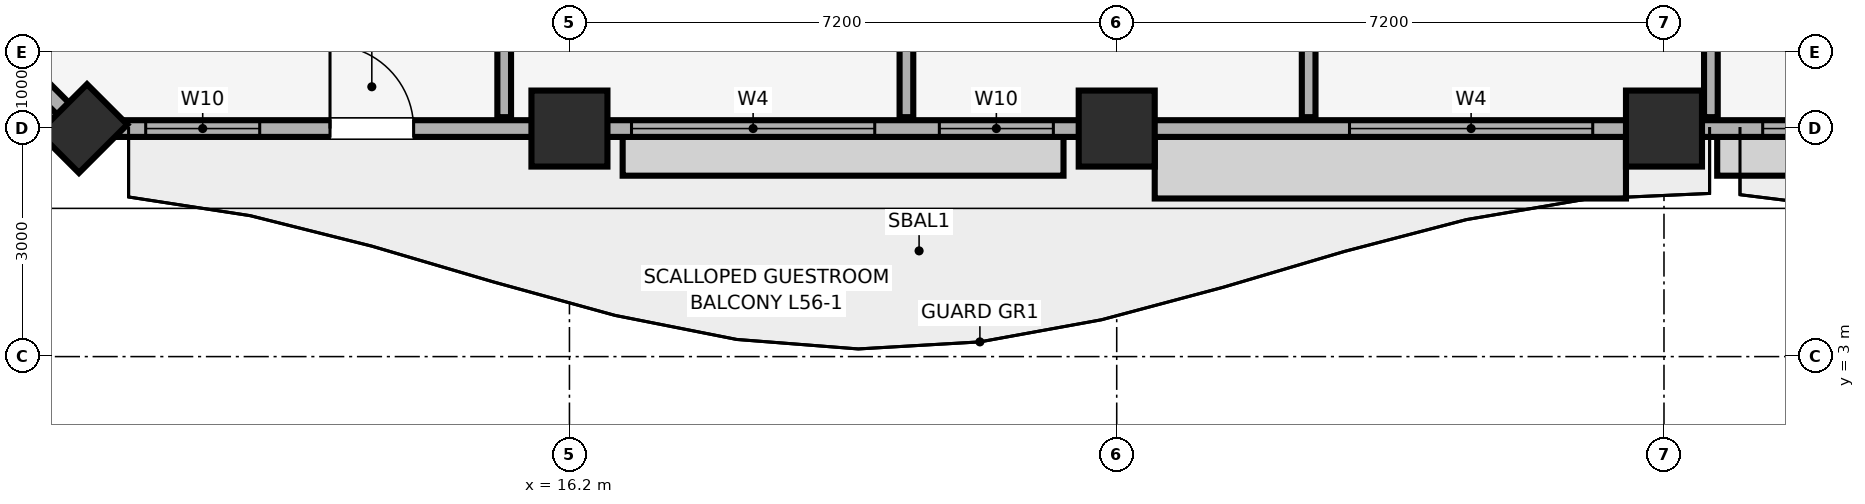
"""IFC4 building model, lengths in metres.
Left out: names, types, materials, properties, quantities, classifications, styles, units other than length and angle.
Written with IfcOpenShell. Run it as: python <this file> out.ifc"""

import sys

from ifc_helpers import new_model, si_unit, direction, frame, frame_2d, origin, origin_2d, place, context, subcontext, project, spatial, rectangle, extrude, element, fill, save


model = new_model("IFC4")
c1 = context("Model", 3, precision=1e-05, world=origin(), true_north=direction((0.0, 1.0)))
c2 = subcontext(c1, "Body", "Model", "MODEL_VIEW")
j1 = project(units=[si_unit("LENGTHUNIT", "METRE"), si_unit("PLANEANGLEUNIT", "RADIAN")], contexts=[c1])
p1 = place(None, origin())
s1 = spatial("IfcSite", under=j1, at=p1, CompositionType="ELEMENT")
p2 = place(p1, origin())
s2 = spatial("IfcBuilding", under=s1, at=p2, CompositionType="ELEMENT")
p3 = place(p2, frame((0.0, 0.0, 229.15)))
s3 = spatial("IfcBuildingStorey", under=s2, at=p3, CompositionType="ELEMENT", Elevation=229.15)
for number, where, z_axis, x_axis in (
    (1, (16.2, 6.0, 0.0), (0.0, 0.0, 1.0), (1.0, 0.0, 0.0)),
    (2, (23.4, 6.0, 0.0), (0.0, 0.0, 1.0), (1.0, 0.0, 0.0)),
    (3, (30.6, 6.0, 0.0), (0.0, 0.0, 1.0), (1.0, 0.0, 0.0)),
):
    element("IfcColumn", number, at=place(p3, frame(where, z_axis=z_axis, x_axis=x_axis)), inside=s3, PredefinedType="COLUMN", context=c2, shape_type="SweptSolid", body=[
        extrude(rectangle(XDim=1.0, YDim=1.0, at=origin_2d()), origin(), (0.0, 0.0, 1.0), 3.71),
    ])
p4 = place(p3, frame((9.8, 6.0, 0.0), z_axis=(0.0, 0.0, 1.0), x_axis=(0.707106781187, 0.707106781187, 0.0)))
e4 = element("IfcColumn", 4, at=p4, inside=s3, PredefinedType="PILASTER", context=c2, shape_type="SweptSolid", body=[
    extrude(rectangle(XDim=0.9, YDim=0.75, at=origin_2d()), origin(), (0.0, 0.0, 1.0), 3.71),
])
p5 = place(p3, frame((9.8, 6.0, 0.0), z_axis=(0.0, 0.0, 1.0), x_axis=(1.0, 0.0, 0.0)))
e5 = element("IfcWall", 5, at=p5, inside=s3, PredefinedType="SOLIDWALL", context=c2, shape_type="SweptSolid", body=[
    extrude(rectangle(XDim=64.4, YDim=0.22, at=frame_2d((32.2, 0.0))), origin(), (0.0, 0.0, 1.0), 2.91),
])
p6 = place(p5, frame((3.25, 0.0, 0.0)))
e6 = element("IfcOpeningElement", 6, at=p6, cuts=e5, PredefinedType="OPENING", context=c2, shape_type="SweptSolid", body=[
    extrude(rectangle(XDim=1.1, YDim=2.15, at=frame_2d((0.55, 1.075))), frame((0.0, 0.12, 0.0), z_axis=(0.0, -1.0, 0.0), x_axis=(1.0, 0.0, 0.0)), (0.0, 0.0, 1.0), 0.24),
])
p7 = place(p5, frame((24.45, 0.0, 0.0)))
e7 = element("IfcOpeningElement", 7, at=p7, cuts=e5, PredefinedType="OPENING", context=c2, shape_type="SweptSolid", body=[
    extrude(rectangle(XDim=1.1, YDim=2.15, at=frame_2d((0.55, 1.075))), frame((0.0, 0.12, 0.0), z_axis=(0.0, -1.0, 0.0), x_axis=(1.0, 0.0, 0.0)), (0.0, 0.0, 1.0), 0.24),
])
p8 = place(p5, frame((45.65, 0.0, 0.0)))
e8 = element("IfcOpeningElement", 8, at=p8, cuts=e5, PredefinedType="OPENING", context=c2, shape_type="SweptSolid", body=[
    extrude(rectangle(XDim=1.1, YDim=2.15, at=frame_2d((0.55, 1.075))), frame((0.0, 0.12, 0.0), z_axis=(0.0, -1.0, 0.0), x_axis=(1.0, 0.0, 0.0)), (0.0, 0.0, 1.0), 0.24),
])
p9 = place(p5, frame((0.825, 0.0, 0.85)))
e9 = element("IfcOpeningElement", 9, at=p9, cuts=e5, PredefinedType="OPENING", context=c2, shape_type="SweptSolid", body=[
    extrude(rectangle(XDim=1.5, YDim=1.4, at=frame_2d((0.75, 0.7))), frame((0.0, 0.12, 0.0), z_axis=(0.0, -1.0, 0.0), x_axis=(1.0, 0.0, 0.0)), (0.0, 0.0, 1.0), 0.24),
])
p10 = place(p5, frame((7.217, 0.0, 0.85)))
e10 = element("IfcOpeningElement", 10, at=p10, cuts=e5, PredefinedType="OPENING", context=c2, shape_type="SweptSolid", body=[
    extrude(rectangle(XDim=3.2, YDim=1.85, at=frame_2d((1.6, 0.925))), frame((0.0, 0.12, 0.0), z_axis=(0.0, -1.0, 0.0), x_axis=(1.0, 0.0, 0.0)), (0.0, 0.0, 1.0), 0.24),
])
p11 = place(p5, frame((11.267, 0.0, 0.85)))
e11 = element("IfcOpeningElement", 11, at=p11, cuts=e5, PredefinedType="OPENING", context=c2, shape_type="SweptSolid", body=[
    extrude(rectangle(XDim=1.5, YDim=1.4, at=frame_2d((0.75, 0.7))), frame((0.0, 0.12, 0.0), z_axis=(0.0, -1.0, 0.0), x_axis=(1.0, 0.0, 0.0)), (0.0, 0.0, 1.0), 0.24),
])
p12 = place(p5, frame((16.663, 0.0, 0.85)))
e12 = element("IfcOpeningElement", 12, at=p12, cuts=e5, PredefinedType="OPENING", context=c2, shape_type="SweptSolid", body=[
    extrude(rectangle(XDim=3.2, YDim=1.85, at=frame_2d((1.6, 0.925))), frame((0.0, 0.12, 0.0), z_axis=(0.0, -1.0, 0.0), x_axis=(1.0, 0.0, 0.0)), (0.0, 0.0, 1.0), 0.24),
])
p13 = place(p5, frame((22.098, 0.0, 0.85)))
e13 = element("IfcOpeningElement", 13, at=p13, cuts=e5, PredefinedType="OPENING", context=c2, shape_type="SweptSolid", body=[
    extrude(rectangle(XDim=1.5, YDim=1.4, at=frame_2d((0.75, 0.7))), frame((0.0, 0.12, 0.0), z_axis=(0.0, -1.0, 0.0), x_axis=(1.0, 0.0, 0.0)), (0.0, 0.0, 1.0), 0.24),
])
p14 = place(p5, frame((29.0, 0.0, 0.85)))
e14 = element("IfcOpeningElement", 14, at=p14, cuts=e5, PredefinedType="OPENING", context=c2, shape_type="SweptSolid", body=[
    extrude(rectangle(XDim=2.4, YDim=1.5, at=frame_2d((1.2, 0.75))), frame((0.0, 0.12, 0.0), z_axis=(0.0, -1.0, 0.0), x_axis=(1.0, 0.0, 0.0)), (0.0, 0.0, 1.0), 0.24),
])
p15 = place(p5, frame((32.4, 0.0, 0.85)))
e15 = element("IfcOpeningElement", 15, at=p15, cuts=e5, PredefinedType="OPENING", context=c2, shape_type="SweptSolid", body=[
    extrude(rectangle(XDim=3.2, YDim=1.85, at=frame_2d((1.6, 0.925))), frame((0.0, 0.12, 0.0), z_axis=(0.0, -1.0, 0.0), x_axis=(1.0, 0.0, 0.0)), (0.0, 0.0, 1.0), 0.24),
])
p16 = place(p5, frame((38.138, 0.0, 0.85)))
e16 = element("IfcOpeningElement", 16, at=p16, cuts=e5, PredefinedType="OPENING", context=c2, shape_type="SweptSolid", body=[
    extrude(rectangle(XDim=3.6, YDim=1.75, at=frame_2d((1.8, 0.875))), frame((0.0, 0.12, 0.0), z_axis=(0.0, -1.0, 0.0), x_axis=(1.0, 0.0, 0.0)), (0.0, 0.0, 1.0), 0.24),
])
p17 = place(p5, frame((48.387, 0.0, 0.85)))
e17 = element("IfcOpeningElement", 17, at=p17, cuts=e5, PredefinedType="OPENING", context=c2, shape_type="SweptSolid", body=[
    extrude(rectangle(XDim=1.5, YDim=1.4, at=frame_2d((0.75, 0.7))), frame((0.0, 0.12, 0.0), z_axis=(0.0, -1.0, 0.0), x_axis=(1.0, 0.0, 0.0)), (0.0, 0.0, 1.0), 0.24),
])
p18 = place(p5, frame((53.583, 0.0, 0.85)))
e18 = element("IfcOpeningElement", 18, at=p18, cuts=e5, PredefinedType="OPENING", context=c2, shape_type="SweptSolid", body=[
    extrude(rectangle(XDim=3.6, YDim=1.75, at=frame_2d((1.8, 0.875))), frame((0.0, 0.12, 0.0), z_axis=(0.0, -1.0, 0.0), x_axis=(1.0, 0.0, 0.0)), (0.0, 0.0, 1.0), 0.24),
])
p19 = place(p5, frame((59.695, 0.0, 0.85)))
e19 = element("IfcOpeningElement", 19, at=p19, cuts=e5, PredefinedType="OPENING", context=c2, shape_type="SweptSolid", body=[
    extrude(rectangle(XDim=3.6, YDim=1.75, at=frame_2d((1.8, 0.875))), frame((0.0, 0.12, 0.0), z_axis=(0.0, -1.0, 0.0), x_axis=(1.0, 0.0, 0.0)), (0.0, 0.0, 1.0), 0.24),
])
p20 = place(p3, frame((6.0, 9.8, 0.0), z_axis=(0.0, 0.0, 1.0), x_axis=(0.707106781187, -0.707106781187, 0.0)))
e20 = element("IfcWall", 20, at=p20, inside=s3, PredefinedType="SOLIDWALL", context=c2, shape_type="SweptSolid", body=[
    extrude(rectangle(XDim=5.374, YDim=0.22, at=frame_2d((2.687, 0.0))), origin(), (0.0, 0.0, 1.0), 2.91),
])
p21 = place(p20, frame((1.637, 0.0, 0.85)))
e21 = element("IfcOpeningElement", 21, at=p21, cuts=e20, PredefinedType="OPENING", context=c2, shape_type="SweptSolid", body=[
    extrude(rectangle(XDim=2.1, YDim=1.6, at=frame_2d((1.05, 0.8))), frame((0.0, 0.12, 0.0), z_axis=(0.0, -1.0, 0.0), x_axis=(1.0, 0.0, 0.0)), (0.0, 0.0, 1.0), 0.24),
])
p22 = place(p3, frame((15.342, 6.15, 0.0), z_axis=(0.0, 0.0, 1.0), x_axis=(0.0, 1.0, 0.0)))
e22 = element("IfcWall", 22, at=p22, inside=s3, PredefinedType="PARTITIONING", context=c2, shape_type="SweptSolid", body=[
    extrude(rectangle(XDim=5.355, YDim=0.18, at=frame_2d((2.677, 0.0))), origin(), (0.0, 0.0, 1.0), 3.08),
])
for number, where, z_axis, x_axis in (
    (23, (20.633, 6.15, 0.0), (0.0, 0.0, 1.0), (0.0, 1.0, 0.0)),
    (24, (25.925, 6.15, 0.0), (0.0, 0.0, 1.0), (0.0, 1.0, 0.0)),
    (25, (31.217, 6.15, 0.0), (0.0, 0.0, 1.0), (0.0, 1.0, 0.0)),
):
    element("IfcWall", number, at=place(p3, frame(where, z_axis=z_axis, x_axis=x_axis)), inside=s3, PredefinedType="PARTITIONING", context=c2, shape_type="SweptSolid", body=[
        extrude(rectangle(XDim=5.355, YDim=0.18, at=frame_2d((2.677, 0.0))), origin(), (0.0, 0.0, 1.0), 3.71),
    ])
p23 = place(p6, origin())
e26 = element("IfcDoor", 26, at=p23, inside=s3, OperationType="SINGLE_SWING_LEFT", PredefinedType="DOOR", context=c2, shape_type="SweptSolid", body=[
    extrude(rectangle(XDim=1.1, YDim=2.15, at=frame_2d((0.55, 1.075))), frame((0.0, 0.025, 0.0), z_axis=(0.0, -1.0, 0.0), x_axis=(1.0, 0.0, 0.0)), (0.0, 0.0, 1.0), 0.05),
])
fill(e6, e26)
p24 = place(p9, origin())
e27 = element("IfcWindow", 27, at=p24, inside=s3, PartitioningType="SINGLE_PANEL", PredefinedType="WINDOW", context=c2, shape_type="SweptSolid", body=[
    extrude(rectangle(XDim=1.5, YDim=1.4, at=frame_2d((0.75, 0.7))), frame((0.0, 0.03, 0.0), z_axis=(0.0, -1.0, 0.0), x_axis=(1.0, 0.0, 0.0)), (0.0, 0.0, 1.0), 0.06),
])
fill(e9, e27)
p25 = place(p10, origin())
e28 = element("IfcWindow", 28, at=p25, inside=s3, PartitioningType="SINGLE_PANEL", PredefinedType="WINDOW", context=c2, shape_type="SweptSolid", body=[
    extrude(rectangle(XDim=3.2, YDim=1.85, at=frame_2d((1.6, 0.925))), frame((0.0, 0.03, 0.0), z_axis=(0.0, -1.0, 0.0), x_axis=(1.0, 0.0, 0.0)), (0.0, 0.0, 1.0), 0.06),
])
fill(e10, e28)
p26 = place(p11, origin())
e29 = element("IfcWindow", 29, at=p26, inside=s3, PartitioningType="SINGLE_PANEL", PredefinedType="WINDOW", context=c2, shape_type="SweptSolid", body=[
    extrude(rectangle(XDim=1.5, YDim=1.4, at=frame_2d((0.75, 0.7))), frame((0.0, 0.03, 0.0), z_axis=(0.0, -1.0, 0.0), x_axis=(1.0, 0.0, 0.0)), (0.0, 0.0, 1.0), 0.06),
])
fill(e11, e29)
p27 = place(p12, origin())
e30 = element("IfcWindow", 30, at=p27, inside=s3, PartitioningType="SINGLE_PANEL", PredefinedType="WINDOW", context=c2, shape_type="SweptSolid", body=[
    extrude(rectangle(XDim=3.2, YDim=1.85, at=frame_2d((1.6, 0.925))), frame((0.0, 0.03, 0.0), z_axis=(0.0, -1.0, 0.0), x_axis=(1.0, 0.0, 0.0)), (0.0, 0.0, 1.0), 0.06),
])
fill(e12, e30)
p28 = place(p13, origin())
e31 = element("IfcWindow", 31, at=p28, inside=s3, PartitioningType="SINGLE_PANEL", PredefinedType="WINDOW", context=c2, shape_type="SweptSolid", body=[
    extrude(rectangle(XDim=1.5, YDim=1.4, at=frame_2d((0.75, 0.7))), frame((0.0, 0.03, 0.0), z_axis=(0.0, -1.0, 0.0), x_axis=(1.0, 0.0, 0.0)), (0.0, 0.0, 1.0), 0.06),
])
fill(e13, e31)
save(model, sys.argv[1])
